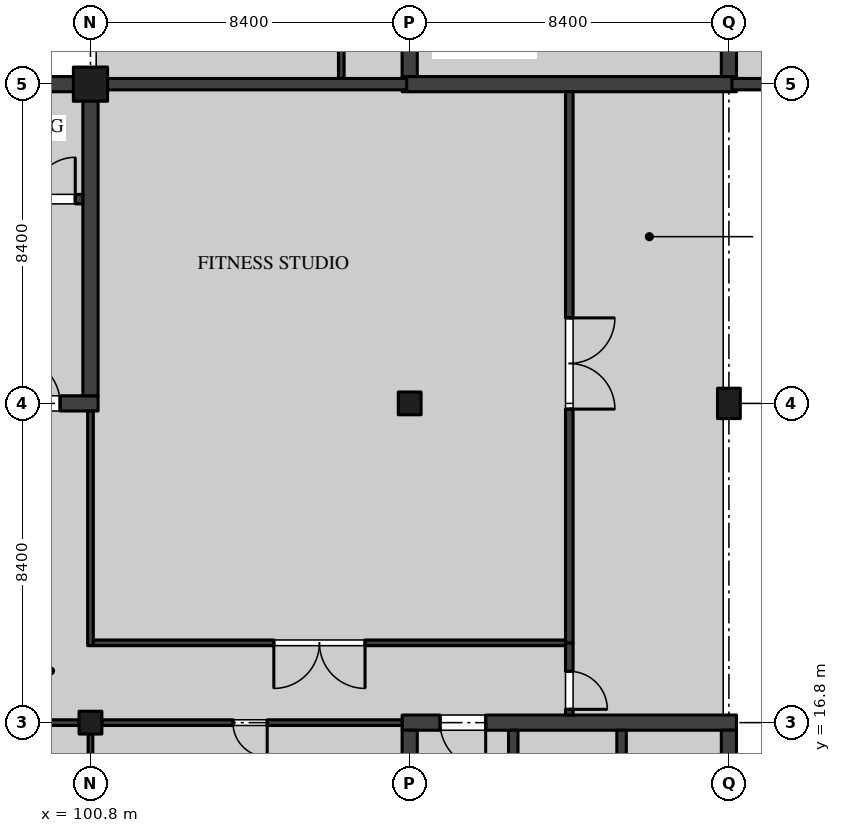
"""IFC4 building model, lengths in metres.
Left out: names, types, materials, properties, quantities, classifications, styles, units other than length and angle.
Written with IfcOpenShell. Run it as: python <this file> out.ifc"""

import sys

from ifc_helpers import new_model, si_unit, direction, frame, frame_2d, origin, origin_2d, place, context, subcontext, project, spatial, polyline, rectangle, outline, extrude, element, fill, save


model = new_model("IFC4")
c1 = context("Model", 3, precision=1e-05, world=origin(), true_north=direction((0.0, 1.0)))
c2 = subcontext(c1, "Body", "Model", "MODEL_VIEW")
j1 = project(units=[si_unit("LENGTHUNIT", "METRE"), si_unit("PLANEANGLEUNIT", "RADIAN")], contexts=[c1])
p1 = place(None, origin())
s1 = spatial("IfcSite", under=j1, at=p1, CompositionType="ELEMENT")
p2 = place(p1, origin())
s2 = spatial("IfcBuilding", under=s1, at=p2, CompositionType="ELEMENT")
p3 = place(p2, frame((0.0, 0.0, 5.4)))
s3 = spatial("IfcBuildingStorey", under=s2, at=p3, CompositionType="ELEMENT", Elevation=5.4)
p4 = place(p3, frame((100.8, 16.8, 0.0), z_axis=(0.0, 0.0, 1.0), x_axis=(1.0, 0.0, 0.0)))
e1 = element("IfcColumn", 1, at=p4, inside=s3, PredefinedType="COLUMN", context=c2, shape_type="SweptSolid", body=[
    extrude(rectangle(XDim=0.6, YDim=0.6, at=origin_2d()), origin(), (0.0, 0.0, 1.0), 3.0),
])
p5 = place(p3, frame((100.8, 33.6, 3.0), z_axis=(0.0, 0.0, 1.0), x_axis=(1.0, 0.0, 0.0)))
e2 = element("IfcColumn", 2, at=p5, inside=s3, PredefinedType="COLUMN", context=c2, shape_type="SweptSolid", body=[
    extrude(rectangle(XDim=0.9, YDim=0.9, at=origin_2d()), origin(), (0.0, 0.0, 1.0), 1.37),
])
p6 = place(p3, frame((109.2, 25.2, 0.0), z_axis=(0.0, 0.0, 1.0), x_axis=(1.0, 0.0, 0.0)))
e3 = element("IfcColumn", 3, at=p6, inside=s3, PredefinedType="COLUMN", context=c2, shape_type="SweptSolid", body=[
    extrude(rectangle(XDim=0.6, YDim=0.6, at=origin_2d()), origin(), (0.0, 0.0, 1.0), 3.0),
])
p7 = place(p3, frame((117.6, 25.2, 0.0), z_axis=(0.0, 0.0, 1.0), x_axis=(1.0, 0.0, 0.0)))
e4 = element("IfcColumn", 4, at=p7, inside=s3, PredefinedType="COLUMN", context=c2, shape_type="SweptSolid", body=[
    extrude(rectangle(XDim=0.6, YDim=0.8, at=origin_2d()), origin(), (0.0, 0.0, 1.0), 3.0),
])
p8 = place(p3, frame((92.2, 25.2, 0.0), z_axis=(0.0, 0.0, 1.0), x_axis=(1.0, 0.0, 0.0)))
e5 = element("IfcWall", 5, at=p8, inside=s3, PredefinedType="SHEAR", context=c2, shape_type="SweptSolid", body=[
    extrude(rectangle(XDim=8.8, YDim=0.4, at=frame_2d((4.4, 0.0))), origin(), (0.0, 0.0, 1.0), 3.0),
])
p9 = place(p8, frame((6.6, 0.0, 0.0)))
e6 = element("IfcOpeningElement", 6, at=p9, cuts=e5, PredefinedType="OPENING", context=c2, shape_type="SweptSolid", body=[
    extrude(rectangle(XDim=1.2, YDim=2.1, at=frame_2d((0.6, 1.05))), frame((0.0, 0.21, 0.0), z_axis=(0.0, -1.0, 0.0), x_axis=(1.0, 0.0, 0.0)), (0.0, 0.0, 1.0), 0.42),
])
p10 = place(p3, frame((92.2, 33.6, 0.0), z_axis=(0.0, 0.0, 1.0), x_axis=(1.0, 0.0, 0.0)))
e7 = element("IfcWall", 7, at=p10, inside=s3, PredefinedType="SHEAR", context=c2, shape_type="SweptSolid", body=[
    extrude(rectangle(XDim=8.8, YDim=0.4, at=frame_2d((4.4, 0.0))), origin(), (0.0, 0.0, 1.0), 3.0),
])
p11 = place(p3, frame((100.8, 25.4, 0.0), z_axis=(0.0, 0.0, 1.0), x_axis=(0.0, 1.0, 0.0)))
e8 = element("IfcWall", 8, at=p11, inside=s3, PredefinedType="SHEAR", context=c2, shape_type="SweptSolid", body=[
    extrude(rectangle(XDim=8.0, YDim=0.4, at=frame_2d((4.0, 0.0))), origin(), (0.0, 0.0, 1.0), 3.0),
])
p12 = place(p3, frame((100.6, 30.575, 0.0), z_axis=(0.0, 0.0, 1.0), x_axis=(-1.0, 0.0, 0.0)))
e9 = element("IfcWall", 9, at=p12, inside=s3, PredefinedType="SOLIDWALL", context=c2, shape_type="SweptSolid", body=[
    extrude(rectangle(XDim=8.0, YDim=0.25, at=frame_2d((4.0, 0.0))), origin(), (0.0, 0.0, 1.0), 3.0),
])
p13 = place(p12, frame((0.2, 0.0, 0.0)))
e10 = element("IfcOpeningElement", 10, at=p13, cuts=e9, PredefinedType="OPENING", context=c2, shape_type="SweptSolid", body=[
    extrude(rectangle(XDim=1.1, YDim=2.1, at=frame_2d((0.55, 1.05))), frame((0.0, 0.135, 0.0), z_axis=(0.0, -1.0, 0.0), x_axis=(1.0, 0.0, 0.0)), (0.0, 0.0, 1.0), 0.27),
])
p14 = place(p3, frame((109.0, 16.8, 0.0), z_axis=(0.0, 0.0, 1.0), x_axis=(1.0, 0.0, 0.0)))
e11 = element("IfcWall", 11, at=p14, inside=s3, PredefinedType="SHEAR", context=c2, shape_type="SweptSolid", body=[
    extrude(rectangle(XDim=8.8, YDim=0.4, at=frame_2d((4.4, 0.0))), origin(), (0.0, 0.0, 1.0), 3.0),
])
p15 = place(p14, frame((1.0, 0.0, 0.0)))
e12 = element("IfcOpeningElement", 12, at=p15, cuts=e11, PredefinedType="OPENING", context=c2, shape_type="SweptSolid", body=[
    extrude(rectangle(XDim=1.2, YDim=2.1, at=frame_2d((0.6, 1.05))), frame((0.0, 0.21, 0.0), z_axis=(0.0, -1.0, 0.0), x_axis=(1.0, 0.0, 0.0)), (0.0, 0.0, 1.0), 0.42),
])
for number, where, z_axis, x_axis in (
    (13, (109.2, 8.6, 0.0), (0.0, 0.0, 1.0), (0.0, 1.0, 0.0)),
    (14, (117.6, 8.6, 0.0), (0.0, 0.0, 1.0), (0.0, 1.0, 0.0)),
):
    element("IfcWall", number, at=place(p3, frame(where, z_axis=z_axis, x_axis=x_axis)), inside=s3, PredefinedType="SHEAR", context=c2, shape_type="SweptSolid", body=[
        extrude(rectangle(XDim=8.0, YDim=0.4, at=frame_2d((4.0, 0.0))), origin(), (0.0, 0.0, 1.0), 3.0),
    ])
p16 = place(p3, frame((111.925, 13.8, 0.0), z_axis=(0.0, 0.0, 1.0), x_axis=(0.0, 1.0, 0.0)))
e15 = element("IfcWall", 15, at=p16, inside=s3, PredefinedType="SOLIDWALL", context=c2, shape_type="SweptSolid", body=[
    extrude(rectangle(XDim=2.8, YDim=0.25, at=frame_2d((1.4, 0.0))), origin(), (0.0, 0.0, 1.0), 3.0),
])
p17 = place(p3, frame((114.775, 14.05, 0.0), z_axis=(0.0, 0.0, 1.0), x_axis=(0.0, 1.0, 0.0)))
e16 = element("IfcWall", 16, at=p17, inside=s3, PredefinedType="SOLIDWALL", context=c2, shape_type="SweptSolid", body=[
    extrude(rectangle(XDim=2.55, YDim=0.25, at=frame_2d((1.275, 0.0))), origin(), (0.0, 0.0, 1.0), 3.0),
])
p18 = place(p3, frame((109.0, 33.6, 0.0), z_axis=(0.0, 0.0, 1.0), x_axis=(1.0, 0.0, 0.0)))
e17 = element("IfcWall", 17, at=p18, inside=s3, PredefinedType="SHEAR", context=c2, shape_type="SweptSolid", body=[
    extrude(rectangle(XDim=8.8, YDim=0.4, at=frame_2d((4.4, 0.0))), origin(), (0.0, 0.0, 1.0), 4.37),
])
p19 = place(p3, frame((109.2, 33.8, 0.0), z_axis=(0.0, 0.0, 1.0), x_axis=(0.0, 1.0, 0.0)))
e18 = element("IfcWall", 18, at=p19, inside=s3, PredefinedType="SHEAR", context=c2, shape_type="SweptSolid", body=[
    extrude(rectangle(XDim=8.0, YDim=0.4, at=frame_2d((4.0, 0.0))), origin(), (0.0, 0.0, 1.0), 4.37),
])
p20 = place(p19, frame((3.875, 0.0, 0.0)))
e19 = element("IfcOpeningElement", 19, at=p20, cuts=e18, PredefinedType="OPENING", context=c2, shape_type="SweptSolid", body=[
    extrude(rectangle(XDim=1.2, YDim=2.1, at=frame_2d((0.6, 1.05))), frame((0.0, 0.21, 0.0), z_axis=(0.0, -1.0, 0.0), x_axis=(1.0, 0.0, 0.0)), (0.0, 0.0, 1.0), 0.42),
])
p21 = place(p3, frame((117.6, 33.8, 0.0), z_axis=(0.0, 0.0, 1.0), x_axis=(0.0, 1.0, 0.0)))
e20 = element("IfcWall", 20, at=p21, inside=s3, PredefinedType="SHEAR", context=c2, shape_type="SweptSolid", body=[
    extrude(rectangle(XDim=8.0, YDim=0.4, at=frame_2d((4.0, 0.0))), origin(), (0.0, 0.0, 1.0), 4.37),
])
p22 = place(p21, frame((3.875, 0.0, 0.0)))
e21 = element("IfcOpeningElement", 21, at=p22, cuts=e20, PredefinedType="OPENING", context=c2, shape_type="SweptSolid", body=[
    extrude(rectangle(XDim=1.2, YDim=2.1, at=frame_2d((0.6, 1.05))), frame((0.0, 0.21, 0.0), z_axis=(0.0, -1.0, 0.0), x_axis=(1.0, 0.0, 0.0)), (0.0, 0.0, 1.0), 0.42),
])
p23 = place(p2, origin())
s4 = spatial("IfcBuildingStorey", under=s2, at=p23, CompositionType="ELEMENT", Elevation=0.0)
p24 = place(p23, frame((117.6, 17.0, 0.0), z_axis=(0.0, 0.0, 1.0), x_axis=(0.0, 1.0, 0.0)))
e22 = element("IfcWall", 22, at=p24, inside=s4, PredefinedType="PARTITIONING", context=c2, shape_type="SweptSolid", body=[
    extrude(rectangle(XDim=1.9, YDim=0.15, at=frame_2d((0.95, 0.0))), origin(), (0.0, 0.0, 1.0), 8.375),
])
p25 = place(p24, frame((0.45, 0.0, 0.0)))
e23 = element("IfcOpeningElement", 23, at=p25, cuts=e22, PredefinedType="OPENING", context=c2, shape_type="SweptSolid", body=[
    extrude(rectangle(XDim=1.0, YDim=2.1, at=frame_2d((0.5, 1.05))), frame((0.0, 0.085, 0.0), z_axis=(0.0, -1.0, 0.0), x_axis=(1.0, 0.0, 0.0)), (0.0, 0.0, 1.0), 0.17),
])
p26 = place(p23, frame((117.6, 18.9, 0.0), z_axis=(0.0, 0.0, 1.0), x_axis=(0.0, 1.0, 0.0)))
e24 = element("IfcWall", 24, at=p26, inside=s4, PredefinedType="PARTITIONING", context=c2, shape_type="SweptSolid", body=[
    extrude(rectangle(XDim=5.85, YDim=0.25, at=frame_2d((2.925, 0.0))), origin(), (0.0, 0.0, 1.0), 8.375),
])
p27 = place(p23, frame((117.6, 25.65, 0.0), z_axis=(0.0, 0.0, 1.0), x_axis=(0.0, 1.0, 0.0)))
e25 = element("IfcWall", 25, at=p27, inside=s4, PredefinedType="PARTITIONING", context=c2, shape_type="SweptSolid", body=[
    extrude(rectangle(XDim=7.75, YDim=0.25, at=frame_2d((3.875, 0.0))), origin(), (0.0, 0.0, 1.0), 8.375),
])
p28 = place(p3, frame((113.4, 17.0, 0.0), z_axis=(0.0, 0.0, 1.0), x_axis=(0.0, 1.0, 0.0)))
e26 = element("IfcWall", 26, at=p28, inside=s3, PredefinedType="PARTITIONING", context=c2, shape_type="SweptSolid", body=[
    extrude(rectangle(XDim=1.9, YDim=0.2, at=frame_2d((0.95, 0.0))), origin(), (0.0, 0.0, 1.0), 4.37),
])
p29 = place(p28, frame((0.15, 0.0, 0.0)))
e27 = element("IfcOpeningElement", 27, at=p29, cuts=e26, PredefinedType="OPENING", context=c2, shape_type="SweptSolid", body=[
    extrude(rectangle(XDim=1.0, YDim=2.4, at=frame_2d((0.5, 1.2))), frame((0.0, 0.11, 0.0), z_axis=(0.0, -1.0, 0.0), x_axis=(1.0, 0.0, 0.0)), (0.0, 0.0, 1.0), 0.22),
])
p30 = place(p3, frame((113.4, 18.9, 0.0), z_axis=(0.0, 0.0, 1.0), x_axis=(0.0, 1.0, 0.0)))
e28 = element("IfcWall", 28, at=p30, inside=s3, PredefinedType="PARTITIONING", context=c2, shape_type="SweptSolid", body=[
    extrude(rectangle(XDim=14.5, YDim=0.2, at=frame_2d((7.25, 0.0))), origin(), (0.0, 0.0, 1.0), 4.37),
])
p31 = place(p30, frame((6.15, 0.0, 0.0)))
e29 = element("IfcOpeningElement", 29, at=p31, cuts=e28, PredefinedType="OPENING", context=c2, shape_type="SweptSolid", body=[
    extrude(rectangle(XDim=2.4, YDim=2.7, at=frame_2d((1.2, 1.35))), frame((0.0, 0.11, 0.0), z_axis=(0.0, -1.0, 0.0), x_axis=(1.0, 0.0, 0.0)), (0.0, 0.0, 1.0), 0.22),
])
p32 = place(p3, frame((100.8, 18.825, 0.0), z_axis=(0.0, 0.0, 1.0), x_axis=(0.0, 1.0, 0.0)))
e30 = element("IfcWall", 30, at=p32, inside=s3, PredefinedType="PARTITIONING", context=c2, shape_type="SweptSolid", body=[
    extrude(rectangle(XDim=6.175, YDim=0.15, at=frame_2d((3.087, 0.0))), origin(), (0.0, 0.0, 1.0), 2.975),
])
p33 = place(p3, frame((100.875, 18.9, 0.0), z_axis=(0.0, 0.0, 1.0), x_axis=(1.0, 0.0, 0.0)))
e31 = element("IfcWall", 31, at=p33, inside=s3, PredefinedType="PARTITIONING", context=c2, shape_type="SweptSolid", body=[
    extrude(rectangle(XDim=12.425, YDim=0.15, at=frame_2d((6.212, 0.0))), origin(), (0.0, 0.0, 1.0), 4.37),
])
p34 = place(p33, frame((4.75, 0.0, 0.0)))
e32 = element("IfcOpeningElement", 32, at=p34, cuts=e31, PredefinedType="OPENING", context=c2, shape_type="SweptSolid", body=[
    extrude(rectangle(XDim=2.4, YDim=2.7, at=frame_2d((1.2, 1.35))), frame((0.0, 0.085, 0.0), z_axis=(0.0, -1.0, 0.0), x_axis=(1.0, 0.0, 0.0)), (0.0, 0.0, 1.0), 0.17),
])
p35 = place(p3, frame((101.1, 16.8, 0.0), z_axis=(0.0, 0.0, 1.0), x_axis=(1.0, 0.0, 0.0)))
e33 = element("IfcWall", 33, at=p35, inside=s3, PredefinedType="PARTITIONING", context=c2, shape_type="SweptSolid", body=[
    extrude(rectangle(XDim=7.9, YDim=0.15, at=frame_2d((3.95, 0.0))), origin(), (0.0, 0.0, 1.0), 4.37),
])
p36 = place(p35, frame((3.45, 0.0, 0.0)))
e34 = element("IfcOpeningElement", 34, at=p36, cuts=e33, PredefinedType="OPENING", context=c2, shape_type="SweptSolid", body=[
    extrude(rectangle(XDim=0.9, YDim=2.1, at=frame_2d((0.45, 1.05))), frame((0.0, 0.085, 0.0), z_axis=(0.0, -1.0, 0.0), x_axis=(1.0, 0.0, 0.0)), (0.0, 0.0, 1.0), 0.17),
])
p37 = place(p3, frame((92.7, 16.8, 0.0), z_axis=(0.0, 0.0, 1.0), x_axis=(1.0, 0.0, 0.0)))
e35 = element("IfcWall", 35, at=p37, inside=s3, PredefinedType="PARTITIONING", context=c2, shape_type="SweptSolid", body=[
    extrude(rectangle(XDim=7.8, YDim=0.15, at=frame_2d((3.9, 0.0))), origin(), (0.0, 0.0, 1.0), 4.37),
])
p38 = place(p37, frame((3.45, 0.0, 0.0)))
e36 = element("IfcOpeningElement", 36, at=p38, cuts=e35, PredefinedType="OPENING", context=c2, shape_type="SweptSolid", body=[
    extrude(rectangle(XDim=0.9, YDim=2.1, at=frame_2d((0.45, 1.05))), frame((0.0, 0.085, 0.0), z_axis=(0.0, -1.0, 0.0), x_axis=(1.0, 0.0, 0.0)), (0.0, 0.0, 1.0), 0.17),
])
p39 = place(p3, frame((100.8, 12.662, 0.0), z_axis=(0.0, 0.0, 1.0), x_axis=(0.0, 1.0, 0.0)))
e37 = element("IfcWall", 37, at=p39, inside=s3, PredefinedType="PARTITIONING", context=c2, shape_type="SweptSolid", body=[
    extrude(rectangle(XDim=3.838, YDim=0.125, at=frame_2d((1.919, 0.0))), origin(), (0.0, 0.0, 1.0), 2.975),
])
p40 = place(p3, frame((107.4, 33.75, 0.0), z_axis=(0.0, 0.0, 1.0), x_axis=(0.0, 1.0, 0.0)))
e38 = element("IfcWall", 38, at=p40, inside=s3, PredefinedType="PARTITIONING", context=c2, shape_type="SweptSolid", body=[
    extrude(rectangle(XDim=8.02, YDim=0.15, at=frame_2d((4.01, 0.0))), origin(), (0.0, 0.0, 1.0), 4.37),
])
p41 = place(p40, frame((4.25, 0.0, 0.0)))
e39 = element("IfcOpeningElement", 39, at=p41, cuts=e38, PredefinedType="OPENING", context=c2, shape_type="SweptSolid", body=[
    extrude(rectangle(XDim=1.35, YDim=2.1, at=frame_2d((0.675, 1.05))), frame((0.0, 0.085, 0.0), z_axis=(0.0, -1.0, 0.0), x_axis=(1.0, 0.0, 0.0)), (0.0, 0.0, 1.0), 0.17),
])
p42 = place(p3, frame((117.678, 33.6, 0.0), z_axis=(0.0, 0.0, 1.0), x_axis=(1.0, 0.0, 0.0)))
e40 = element("IfcWall", 40, at=p42, inside=s3, PredefinedType="SOLIDWALL", context=c2, shape_type="SweptSolid", body=[
    extrude(outline(polyline([(0.0, 0.0), (7.892, 0.0), (7.892, 3.6), (7.872, 3.6), (0.122, 3.6), (0.0, 3.6), (0.0, 0.0)])), frame((0.0, 0.15, 0.0), z_axis=(0.0, -1.0, 0.0), x_axis=(1.0, 0.0, 0.0)), (0.0, 0.0, 1.0), 0.3),
])
p43 = place(p3, frame((109.122, 33.6, 0.0), z_axis=(0.0, 0.0, 1.0), x_axis=(-1.0, 0.0, 0.0)))
e41 = element("IfcWall", 41, at=p43, inside=s3, PredefinedType="SOLIDWALL", context=c2, shape_type="SweptSolid", body=[
    extrude(outline(polyline([(0.0, 0.0), (8.122, 0.0), (8.122, 3.6), (7.872, 3.6), (0.122, 3.6), (0.0, 3.6), (0.0, 0.0)])), frame((0.0, 0.15, 0.0), z_axis=(0.0, -1.0, 0.0), x_axis=(1.0, 0.0, 0.0)), (0.0, 0.0, 1.0), 0.3),
])
p44 = place(p9, origin())
e42 = element("IfcDoor", 42, at=p44, inside=s3, OperationType="SINGLE_SWING_RIGHT", PredefinedType="DOOR", context=c2, shape_type="SweptSolid", body=[
    extrude(rectangle(XDim=1.2, YDim=2.1, at=frame_2d((0.6, 1.05))), frame((0.0, 0.035, 0.0), z_axis=(0.0, -1.0, 0.0), x_axis=(1.0, 0.0, 0.0)), (0.0, 0.0, 1.0), 0.07),
])
fill(e6, e42)
p45 = place(p13, frame((1.1, 0.0, 0.0), z_axis=(0.0, 0.0, 1.0), x_axis=(-1.0, 0.0, 0.0)))
e43 = element("IfcDoor", 43, at=p45, inside=s3, OperationType="SINGLE_SWING_LEFT", PredefinedType="DOOR", context=c2, shape_type="SweptSolid", body=[
    extrude(rectangle(XDim=1.1, YDim=2.1, at=frame_2d((0.55, 1.05))), frame((0.0, 0.035, 0.0), z_axis=(0.0, -1.0, 0.0), x_axis=(1.0, 0.0, 0.0)), (0.0, 0.0, 1.0), 0.07),
])
fill(e10, e43)
p46 = place(p15, frame((1.2, 0.0, 0.0), z_axis=(0.0, 0.0, 1.0), x_axis=(-1.0, 0.0, 0.0)))
e44 = element("IfcDoor", 44, at=p46, inside=s3, OperationType="SINGLE_SWING_RIGHT", PredefinedType="DOOR", context=c2, shape_type="SweptSolid", body=[
    extrude(rectangle(XDim=1.2, YDim=2.1, at=frame_2d((0.6, 1.05))), frame((0.0, 0.035, 0.0), z_axis=(0.0, -1.0, 0.0), x_axis=(1.0, 0.0, 0.0)), (0.0, 0.0, 1.0), 0.07),
])
fill(e12, e44)
p47 = place(p29, frame((1.0, 0.0, 0.0), z_axis=(0.0, 0.0, 1.0), x_axis=(-1.0, 0.0, 0.0)))
e45 = element("IfcDoor", 45, at=p47, inside=s3, OperationType="SINGLE_SWING_LEFT", PredefinedType="DOOR", context=c2, shape_type="SweptSolid", body=[
    extrude(rectangle(XDim=1.0, YDim=2.4, at=frame_2d((0.5, 1.2))), frame((0.0, 0.03, 0.0), z_axis=(0.0, -1.0, 0.0), x_axis=(1.0, 0.0, 0.0)), (0.0, 0.0, 1.0), 0.06),
])
fill(e27, e45)
p48 = place(p31, frame((2.4, 0.0, 0.0), z_axis=(0.0, 0.0, 1.0), x_axis=(-1.0, 0.0, 0.0)))
e46 = element("IfcDoor", 46, at=p48, inside=s3, OperationType="DOUBLE_DOOR_SINGLE_SWING", PredefinedType="DOOR", context=c2, shape_type="SweptSolid", body=[
    extrude(rectangle(XDim=2.4, YDim=2.7, at=frame_2d((1.2, 1.35))), frame((0.0, 0.03, 0.0), z_axis=(0.0, -1.0, 0.0), x_axis=(1.0, 0.0, 0.0)), (0.0, 0.0, 1.0), 0.06),
])
fill(e29, e46)
p49 = place(p34, frame((2.4, 0.0, 0.0), z_axis=(0.0, 0.0, 1.0), x_axis=(-1.0, 0.0, 0.0)))
e47 = element("IfcDoor", 47, at=p49, inside=s3, OperationType="DOUBLE_DOOR_SINGLE_SWING", PredefinedType="DOOR", context=c2, shape_type="SweptSolid", body=[
    extrude(rectangle(XDim=2.4, YDim=2.7, at=frame_2d((1.2, 1.35))), frame((0.0, 0.025, 0.0), z_axis=(0.0, -1.0, 0.0), x_axis=(1.0, 0.0, 0.0)), (0.0, 0.0, 1.0), 0.05),
])
fill(e32, e47)
p50 = place(p36, frame((0.9, 0.0, 0.0), z_axis=(0.0, 0.0, 1.0), x_axis=(-1.0, 0.0, 0.0)))
e48 = element("IfcDoor", 48, at=p50, inside=s3, OperationType="SINGLE_SWING_RIGHT", PredefinedType="DOOR", context=c2, shape_type="SweptSolid", body=[
    extrude(rectangle(XDim=0.9, YDim=2.1, at=frame_2d((0.45, 1.05))), frame((0.0, 0.025, 0.0), z_axis=(0.0, -1.0, 0.0), x_axis=(1.0, 0.0, 0.0)), (0.0, 0.0, 1.0), 0.05),
])
fill(e34, e48)
save(model, sys.argv[1])
